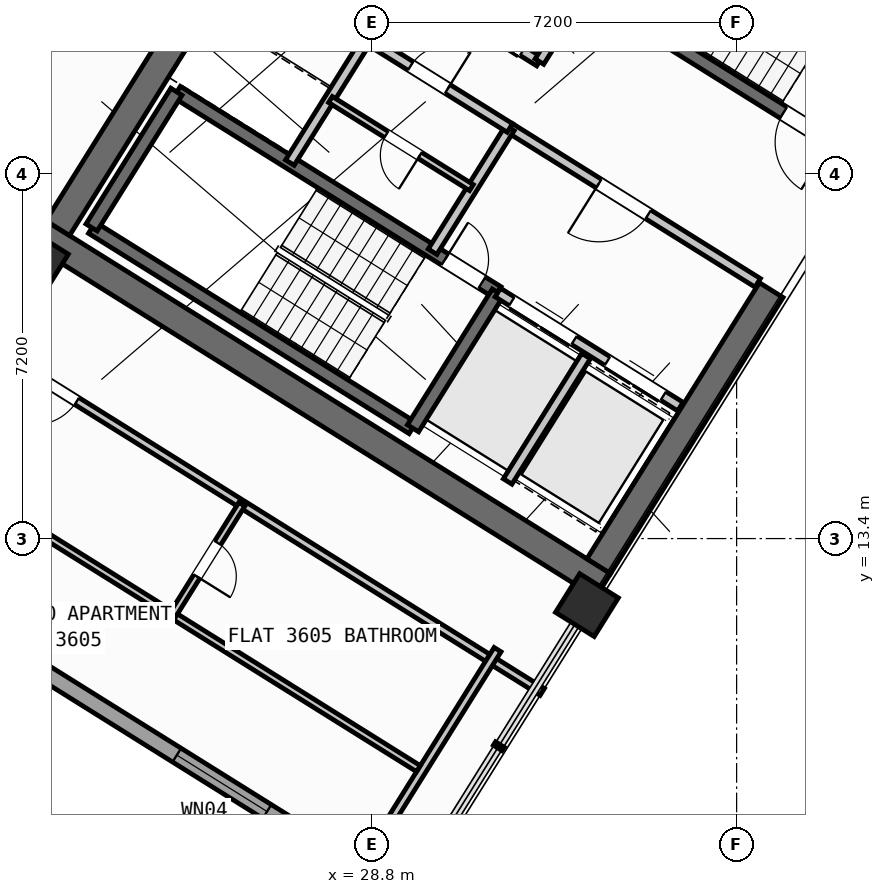
"""IFC4 building model, lengths in metres.
Left out: names, types, materials, properties, quantities, classifications, styles, units other than length and angle.
Written with IfcOpenShell. Run it as: python <this file> out.ifc"""

import sys

from ifc_helpers import new_model, si_unit, direction, frame, frame_2d, origin, origin_2d, place, context, subcontext, project, spatial, rectangle, hollow_rectangle, extrude, source, transform, mapped, element, fill, save


model = new_model("IFC4")
c1 = context("Model", 3, precision=1e-05, world=origin(), true_north=direction((0.0, 1.0)))
c2 = subcontext(c1, "Body", "Model", "MODEL_VIEW")
j1 = project(units=[si_unit("LENGTHUNIT", "METRE"), si_unit("PLANEANGLEUNIT", "RADIAN")], contexts=[c1])
p1 = place(None, origin())
s1 = spatial("IfcSite", under=j1, at=p1, CompositionType="ELEMENT")
p2 = place(p1, origin())
s2 = spatial("IfcBuilding", under=s1, at=p2, CompositionType="ELEMENT")
p3 = place(p2, frame((0.0, 0.0, 144.3)))
s3 = spatial("IfcBuildingStorey", under=s2, at=p3, CompositionType="ELEMENT", Elevation=144.3)
p4 = place(p3, frame((33.366, 12.477, 0.0), z_axis=(0.0, 0.0, 1.0), x_axis=(-0.848047359947, 0.529920442413, 0.0)))
e1 = element("IfcWall", 1, at=p4, inside=s3, PredefinedType="SHEAR", context=c2, shape_type="SweptSolid", body=[
    extrude(rectangle(XDim=13.14, YDim=0.55, at=frame_2d((6.57, 0.0))), origin(), (0.0, 0.0, 1.0), 3.35),
])
p5 = place(p3, frame((36.683, 18.304, 0.0), z_axis=(0.0, 0.0, 1.0), x_axis=(-0.529896466841, -0.848062341122, 0.0)))
e2 = element("IfcWall", 2, at=p5, inside=s3, PredefinedType="SHEAR", context=c2, shape_type="SweptSolid", body=[
    extrude(rectangle(XDim=6.425, YDim=0.55, at=frame_2d((3.212, 0.0))), origin(), (0.0, 0.0, 1.0), 3.35),
])
p6 = place(p3, frame((26.007, 24.976, 0.0), z_axis=(0.0, 0.0, 1.0), x_axis=(-0.529923795287, -0.848045264823, 0.0)))
e3 = element("IfcWall", 3, at=p6, inside=s3, PredefinedType="SHEAR", context=c2, shape_type="SweptSolid", body=[
    extrude(rectangle(XDim=6.425, YDim=0.55, at=frame_2d((3.212, 0.0))), origin(), (0.0, 0.0, 1.0), 3.35),
])
m1 = source(origin(), c2, "Body", "SweptSolid", [
    extrude(hollow_rectangle(XDim=0.9, YDim=0.9, WallThickness=0.036, at=origin_2d()), origin(), (0.0, 0.0, 1.0), 3.6),
])
for number, where, z_axis, x_axis in (
    (4, (33.046, 12.087, 0.0), (0.0, 0.0, 1.0), (-0.848, 0.53, 0.0)),
    (5, (22.191, 18.87, 0.0), (0.0, 0.0, 1.0), (-0.848, 0.53, 0.0)),
):
    element("IfcColumn", number, at=place(p3, frame(where, z_axis=z_axis, x_axis=x_axis)), inside=s3, PredefinedType="COLUMN", context=c2, shape_type="MappedRepresentation", body=[
        mapped(m1, transform((0.0, 0.0, 0.0), scale=1.0)),
    ])
p7 = place(p3, frame((29.268, 6.429, 0.0), z_axis=(0.0, 0.0, 1.0), x_axis=(-0.848049971435, 0.529916263149, 0.0)))
e6 = element("IfcWall", 6, at=p7, inside=s3, PredefinedType="STANDARD", context=c2, shape_type="SweptSolid", body=[
    extrude(rectangle(XDim=31.588, YDim=0.32, at=frame_2d((15.794, 0.0))), origin(), (0.0, 0.0, 1.0), 3.35),
])
p8 = place(p7, frame((16.362, 0.0, 0.0)))
e7 = element("IfcOpeningElement", 7, at=p8, cuts=e6, PredefinedType="OPENING", context=c2, shape_type="SweptSolid", body=[
    extrude(rectangle(XDim=1.2, YDim=2.15, at=frame_2d((0.6, 1.075))), frame((0.0, 0.17, 0.0), z_axis=(0.0, -1.0, 0.0), x_axis=(1.0, 0.0, 0.0)), (0.0, 0.0, 1.0), 0.34),
])
p9 = place(p7, frame((2.989, 0.0, 0.8)))
e8 = element("IfcOpeningElement", 8, at=p9, cuts=e6, PredefinedType="OPENING", context=c2, shape_type="SweptSolid", body=[
    extrude(rectangle(XDim=2.1, YDim=1.55, at=frame_2d((1.05, 0.775))), frame((0.0, 0.17, 0.0), z_axis=(0.0, -1.0, 0.0), x_axis=(1.0, 0.0, 0.0)), (0.0, 0.0, 1.0), 0.34),
])
p10 = place(p7, frame((8.359, 0.0, 0.8)))
e9 = element("IfcOpeningElement", 9, at=p10, cuts=e6, PredefinedType="OPENING", context=c2, shape_type="SweptSolid", body=[
    extrude(rectangle(XDim=2.1, YDim=1.55, at=frame_2d((1.05, 0.775))), frame((0.0, 0.17, 0.0), z_axis=(0.0, -1.0, 0.0), x_axis=(1.0, 0.0, 0.0)), (0.0, 0.0, 1.0), 0.34),
])
p11 = place(p7, frame((13.284, 0.0, 0.95)))
e10 = element("IfcOpeningElement", 10, at=p11, cuts=e6, PredefinedType="OPENING", context=c2, shape_type="SweptSolid", body=[
    extrude(rectangle(XDim=1.2, YDim=1.4, at=frame_2d((0.6, 0.7))), frame((0.0, 0.17, 0.0), z_axis=(0.0, -1.0, 0.0), x_axis=(1.0, 0.0, 0.0)), (0.0, 0.0, 1.0), 0.34),
])
p12 = place(p7, frame((29.188, 0.0, 0.95)))
e11 = element("IfcOpeningElement", 11, at=p12, cuts=e6, PredefinedType="OPENING", context=c2, shape_type="SweptSolid", body=[
    extrude(rectangle(XDim=1.2, YDim=1.4, at=frame_2d((0.6, 0.7))), frame((0.0, 0.17, 0.0), z_axis=(0.0, -1.0, 0.0), x_axis=(1.0, 0.0, 0.0)), (0.0, 0.0, 1.0), 0.34),
])
p13 = place(p7, frame((19.674, 0.0, 1.0)))
e12 = element("IfcOpeningElement", 12, at=p13, cuts=e6, PredefinedType="OPENING", context=c2, shape_type="SweptSolid", body=[
    extrude(rectangle(XDim=0.9, YDim=1.25, at=frame_2d((0.45, 0.625))), frame((0.0, 0.17, 0.0), z_axis=(0.0, -1.0, 0.0), x_axis=(1.0, 0.0, 0.0)), (0.0, 0.0, 1.0), 0.34),
])
p14 = place(p7, frame((21.896, 0.0, 1.0)))
e13 = element("IfcOpeningElement", 13, at=p14, cuts=e6, PredefinedType="OPENING", context=c2, shape_type="SweptSolid", body=[
    extrude(rectangle(XDim=0.9, YDim=1.25, at=frame_2d((0.45, 0.625))), frame((0.0, 0.17, 0.0), z_axis=(0.0, -1.0, 0.0), x_axis=(1.0, 0.0, 0.0)), (0.0, 0.0, 1.0), 0.34),
])
p15 = place(p7, frame((24.106, 0.0, 1.0)))
e14 = element("IfcOpeningElement", 14, at=p15, cuts=e6, PredefinedType="OPENING", context=c2, shape_type="SweptSolid", body=[
    extrude(rectangle(XDim=0.65, YDim=1.15, at=frame_2d((0.325, 0.575))), frame((0.0, 0.17, 0.0), z_axis=(0.0, -1.0, 0.0), x_axis=(1.0, 0.0, 0.0)), (0.0, 0.0, 1.0), 0.34),
])
p16 = place(p7, frame((26.366, 0.0, 1.0)))
e15 = element("IfcOpeningElement", 15, at=p16, cuts=e6, PredefinedType="OPENING", context=c2, shape_type="SweptSolid", body=[
    extrude(rectangle(XDim=0.9, YDim=1.25, at=frame_2d((0.45, 0.625))), frame((0.0, 0.17, 0.0), z_axis=(0.0, -1.0, 0.0), x_axis=(1.0, 0.0, 0.0)), (0.0, 0.0, 1.0), 0.34),
])
p17 = place(p3, frame((29.605, 15.581, 0.0), z_axis=(0.0, 0.0, 1.0), x_axis=(-0.848036911448, 0.529937163087, 0.0)))
e16 = element("IfcWall", 16, at=p17, inside=s3, PredefinedType="SHEAR", context=c2, shape_type="SweptSolid", body=[
    extrude(rectangle(XDim=7.46, YDim=0.26, at=frame_2d((3.73, 0.0))), origin(), (0.0, 0.0, 1.0), 3.35),
])
p18 = place(p3, frame((31.28, 18.261, 0.0), z_axis=(0.0, 0.0, 1.0), x_axis=(-0.848051618787, 0.529913626805, 0.0)))
e17 = element("IfcWall", 17, at=p18, inside=s3, PredefinedType="SHEAR", context=c2, shape_type="SweptSolid", body=[
    extrude(rectangle(XDim=7.46, YDim=0.26, at=frame_2d((3.73, 0.0))), origin(), (0.0, 0.0, 1.0), 3.35),
])
p19 = place(p18, frame((0.36, 0.0, 0.0)))
e18 = element("IfcOpeningElement", 18, at=p19, cuts=e17, PredefinedType="OPENING", context=c2, shape_type="SweptSolid", body=[
    extrude(rectangle(XDim=0.86, YDim=2.05, at=frame_2d((0.43, 1.025))), frame((0.0, 0.14, 0.0), z_axis=(0.0, -1.0, 0.0), x_axis=(1.0, 0.0, 0.0)), (0.0, 0.0, 1.0), 0.28),
])
p20 = place(p3, frame((31.288, 18.256, 0.0), z_axis=(0.0, 0.0, 1.0), x_axis=(-0.529943379326, -0.848033026897, 0.0)))
e19 = element("IfcWall", 19, at=p20, inside=s3, PredefinedType="SHEAR", context=c2, shape_type="SweptSolid", body=[
    extrude(rectangle(XDim=3.16, YDim=0.26, at=frame_2d((1.58, 0.0))), origin(), (0.0, 0.0, 1.0), 3.35),
])
p21 = place(p3, frame((24.945, 22.22, 0.0), z_axis=(0.0, 0.0, 1.0), x_axis=(-0.529908658664, -0.84805472316, 0.0)))
e20 = element("IfcWall", 20, at=p21, inside=s3, PredefinedType="SHEAR", context=c2, shape_type="SweptSolid", body=[
    extrude(rectangle(XDim=3.16, YDim=0.26, at=frame_2d((1.58, 0.0))), origin(), (0.0, 0.0, 1.0), 3.35),
])
p22 = place(p3, frame((38.046, 21.108, 0.0), z_axis=(0.0, 0.0, 1.0), x_axis=(-0.848054434086, 0.529909121291, 0.0)))
e21 = element("IfcWall", 21, at=p22, inside=s3, PredefinedType="SHEAR", context=c2, shape_type="SweptSolid", body=[
    extrude(rectangle(XDim=7.33, YDim=0.26, at=frame_2d((3.665, 0.0))), origin(), (0.0, 0.0, 1.0), 3.35),
])
p23 = place(p22, frame((0.22, 0.0, 0.0)))
e22 = element("IfcOpeningElement", 22, at=p23, cuts=e21, PredefinedType="OPENING", context=c2, shape_type="SweptSolid", body=[
    extrude(rectangle(XDim=1.1, YDim=2.1, at=frame_2d((0.55, 1.05))), frame((0.0, 0.14, 0.0), z_axis=(0.0, -1.0, 0.0), x_axis=(1.0, 0.0, 0.0)), (0.0, 0.0, 1.0), 0.28),
])
p24 = place(p3, frame((34.891, 16.005, 0.0), z_axis=(0.0, 0.0, 1.0), x_axis=(-0.848062873452, 0.529895614884, 0.0)))
e23 = element("IfcWall", 23, at=p24, inside=s3, PredefinedType="STANDARD", context=c2, shape_type="SweptSolid", body=[
    extrude(rectangle(XDim=4.248, YDim=0.2, at=frame_2d((2.124, 0.0))), origin(), (0.0, 0.0, 1.0), 3.34),
])
p25 = place(p24, frame((0.398, 0.0, 0.0)))
e24 = element("IfcOpeningElement", 24, at=p25, cuts=e23, PredefinedType="OPENING", context=c2, shape_type="SweptSolid", body=[
    extrude(rectangle(XDim=1.3, YDim=2.2, at=frame_2d((0.65, 1.1))), frame((0.0, 0.11, 0.0), z_axis=(0.0, -1.0, 0.0), x_axis=(1.0, 0.0, 0.0)), (0.0, 0.0, 1.0), 0.22),
])
p26 = place(p24, frame((2.473, 0.0, 0.0)))
e25 = element("IfcOpeningElement", 25, at=p26, cuts=e23, PredefinedType="OPENING", context=c2, shape_type="SweptSolid", body=[
    extrude(rectangle(XDim=1.45, YDim=2.25, at=frame_2d((0.725, 1.125))), frame((0.0, 0.11, 0.0), z_axis=(0.0, -1.0, 0.0), x_axis=(1.0, 0.0, 0.0)), (0.0, 0.0, 1.0), 0.22),
])
p27 = place(p3, frame((36.417, 18.447, 0.0), z_axis=(0.0, 0.0, 1.0), x_axis=(-0.848064879198, 0.529892404805, 0.0)))
e26 = element("IfcWall", 26, at=p27, inside=s3, PredefinedType="STANDARD", context=c2, shape_type="SweptSolid", body=[
    extrude(rectangle(XDim=5.768, YDim=0.2, at=frame_2d((2.884, 0.0))), origin(), (0.0, 0.0, 1.0), 3.34),
])
p28 = place(p27, frame((2.548, 0.0, 0.0)))
e27 = element("IfcOpeningElement", 27, at=p28, cuts=e26, PredefinedType="OPENING", context=c2, shape_type="SweptSolid", body=[
    extrude(rectangle(XDim=1.15, YDim=2.1, at=frame_2d((0.575, 1.05))), frame((0.0, 0.11, 0.0), z_axis=(0.0, -1.0, 0.0), x_axis=(1.0, 0.0, 0.0)), (0.0, 0.0, 1.0), 0.22),
])
p29 = place(p3, frame((32.108, 22.814, 0.0), z_axis=(0.0, 0.0, 1.0), x_axis=(-0.848042229521, 0.529928652696, 0.0)))
e28 = element("IfcWall", 28, at=p29, inside=s3, PredefinedType="STANDARD", context=c2, shape_type="SweptSolid", body=[
    extrude(rectangle(XDim=5.62, YDim=0.2, at=frame_2d((2.81, 0.0))), origin(), (0.0, 0.0, 1.0), 3.34),
])
p30 = place(p29, frame((0.39, 0.0, 0.0)))
e29 = element("IfcOpeningElement", 29, at=p30, cuts=e28, PredefinedType="OPENING", context=c2, shape_type="SweptSolid", body=[
    extrude(rectangle(XDim=1.1, YDim=2.15, at=frame_2d((0.55, 1.075))), frame((0.0, 0.11, 0.0), z_axis=(0.0, -1.0, 0.0), x_axis=(1.0, 0.0, 0.0)), (0.0, 0.0, 1.0), 0.22),
])
p31 = place(p29, frame((2.25, 0.0, 0.0)))
e30 = element("IfcOpeningElement", 30, at=p31, cuts=e28, PredefinedType="OPENING", context=c2, shape_type="SweptSolid", body=[
    extrude(rectangle(XDim=1.1, YDim=2.15, at=frame_2d((0.55, 1.075))), frame((0.0, 0.11, 0.0), z_axis=(0.0, -1.0, 0.0), x_axis=(1.0, 0.0, 0.0)), (0.0, 0.0, 1.0), 0.22),
])
p32 = place(p29, frame((4.11, 0.0, 0.0)))
e31 = element("IfcOpeningElement", 31, at=p32, cuts=e28, PredefinedType="OPENING", context=c2, shape_type="SweptSolid", body=[
    extrude(rectangle(XDim=1.1, YDim=2.15, at=frame_2d((0.55, 1.075))), frame((0.0, 0.11, 0.0), z_axis=(0.0, -1.0, 0.0), x_axis=(1.0, 0.0, 0.0)), (0.0, 0.0, 1.0), 0.22),
])
p33 = place(p3, frame((32.982, 24.213, 0.0), z_axis=(0.0, 0.0, 1.0), x_axis=(-0.529839334948, -0.84809803628, 0.0)))
e32 = element("IfcWall", 32, at=p33, inside=s3, PredefinedType="STANDARD", context=c2, shape_type="SweptSolid", body=[
    extrude(rectangle(XDim=1.65, YDim=0.2, at=frame_2d((0.825, 0.0))), origin(), (0.0, 0.0, 1.0), 3.34),
])
p34 = place(p3, frame((33.029, 17.003, 0.0), z_axis=(0.0, 0.0, 1.0), x_axis=(-0.529916267533, -0.848049968695, 0.0)))
e33 = element("IfcWall", 33, at=p34, inside=s3, PredefinedType="STANDARD", context=c2, shape_type="SweptSolid", body=[
    extrude(rectangle(XDim=2.92, YDim=0.2, at=frame_2d((1.46, 0.0))), origin(), (0.0, 0.0, 1.0), 3.34),
])
for number, where, z_axis, x_axis in (
    (34, (31.525, 21.504, 0.0), (0.0, 0.0, 1.0), (-0.53, -0.848, 0.0)),
    (35, (28.71, 23.263, 0.0), (0.0, 0.0, 1.0), (-0.53, -0.848, 0.0)),
):
    element("IfcWall", number, at=place(p3, frame(where, z_axis=z_axis, x_axis=x_axis)), inside=s3, PredefinedType="STANDARD", context=c2, shape_type="SweptSolid", body=[
        extrude(rectangle(XDim=2.88, YDim=0.2, at=frame_2d((1.44, 0.0))), origin(), (0.0, 0.0, 1.0), 3.34),
    ])
p35 = place(p3, frame((31.525, 21.504, 0.0), z_axis=(0.0, 0.0, 1.0), x_axis=(-0.848040211232, 0.529931882541, 0.0)))
e36 = element("IfcWall", 36, at=p35, inside=s3, PredefinedType="STANDARD", context=c2, shape_type="SweptSolid", body=[
    extrude(rectangle(XDim=6.218, YDim=0.2, at=frame_2d((3.109, 0.0))), origin(), (0.0, 0.0, 1.0), 3.34),
])
p36 = place(p35, frame((4.4, 0.0, 0.0)))
e37 = element("IfcOpeningElement", 37, at=p36, cuts=e36, PredefinedType="OPENING", context=c2, shape_type="SweptSolid", body=[
    extrude(rectangle(XDim=0.86, YDim=2.05, at=frame_2d((0.43, 1.025))), frame((0.0, 0.11, 0.0), z_axis=(0.0, -1.0, 0.0), x_axis=(1.0, 0.0, 0.0)), (0.0, 0.0, 1.0), 0.22),
])
p37 = place(p35, frame((1.45, 0.0, 0.0)))
e38 = element("IfcOpeningElement", 38, at=p37, cuts=e36, PredefinedType="OPENING", context=c2, shape_type="SweptSolid", body=[
    extrude(rectangle(XDim=0.86, YDim=2.05, at=frame_2d((0.43, 1.025))), frame((0.0, 0.11, 0.0), z_axis=(0.0, -1.0, 0.0), x_axis=(1.0, 0.0, 0.0)), (0.0, 0.0, 1.0), 0.22),
])
p38 = place(p3, frame((30.766, 20.327, 0.0), z_axis=(0.0, 0.0, 1.0), x_axis=(-0.848052663127, 0.529911955482, 0.0)))
e39 = element("IfcWall", 39, at=p38, inside=s3, PredefinedType="PLUMBINGWALL", context=c2, shape_type="SweptSolid", body=[
    extrude(rectangle(XDim=3.28, YDim=0.14, at=frame_2d((1.64, 0.0))), origin(), (0.0, 0.0, 1.0), 3.34),
])
p39 = place(p38, frame((1.2, 0.0, 0.0)))
e40 = element("IfcOpeningElement", 40, at=p39, cuts=e39, PredefinedType="OPENING", context=c2, shape_type="SweptSolid", body=[
    extrude(rectangle(XDim=0.78, YDim=2.05, at=frame_2d((0.39, 1.025))), frame((0.0, 0.08, 0.0), z_axis=(0.0, -1.0, 0.0), x_axis=(1.0, 0.0, 0.0)), (0.0, 0.0, 1.0), 0.16),
])
p40 = place(p3, frame((32.164, 10.374, 0.0), z_axis=(0.0, 0.0, 1.0), x_axis=(-0.848044107957, 0.529925646633, 0.0)))
e41 = element("IfcWall", 41, at=p40, inside=s3, PredefinedType="PARTITIONING", context=c2, shape_type="SweptSolid", body=[
    extrude(rectangle(XDim=15.57, YDim=0.16, at=frame_2d((7.785, 0.0))), origin(), (0.0, 0.0, 1.0), 3.34),
])
p41 = place(p40, frame((10.83, 0.0, 0.0)))
e42 = element("IfcOpeningElement", 42, at=p41, cuts=e41, PredefinedType="OPENING", context=c2, shape_type="SweptSolid", body=[
    extrude(rectangle(XDim=1.0, YDim=2.1, at=frame_2d((0.5, 1.05))), frame((0.0, 0.09, 0.0), z_axis=(0.0, -1.0, 0.0), x_axis=(1.0, 0.0, 0.0)), (0.0, 0.0, 1.0), 0.18),
])
p42 = place(p3, frame((31.282, 11.208, 0.0), z_axis=(0.0, 0.0, 1.0), x_axis=(-0.529938869374, -0.84803584519, 0.0)))
e43 = element("IfcWall", 43, at=p42, inside=s3, PredefinedType="PARTITIONING", context=c2, shape_type="SweptSolid", body=[
    extrude(rectangle(XDim=5.48, YDim=0.16, at=frame_2d((2.74, 0.0))), origin(), (0.0, 0.0, 1.0), 3.34),
])
p43 = place(p3, frame((29.72, 8.859, 0.0), z_axis=(0.0, 0.0, 1.0), x_axis=(-0.848049134363, 0.529917602752, 0.0)))
e44 = element("IfcWall", 44, at=p43, inside=s3, PredefinedType="PLUMBINGWALL", context=c2, shape_type="SweptSolid", body=[
    extrude(rectangle(XDim=14.3, YDim=0.14, at=frame_2d((7.15, 0.0))), origin(), (0.0, 0.0, 1.0), 3.34),
])
p44 = place(p43, frame((9.57, 0.0, 0.0)))
e45 = element("IfcOpeningElement", 45, at=p44, cuts=e44, PredefinedType="OPENING", context=c2, shape_type="SweptSolid", body=[
    extrude(rectangle(XDim=0.92, YDim=2.08, at=frame_2d((0.46, 1.04))), frame((0.0, 0.08, 0.0), z_axis=(0.0, -1.0, 0.0), x_axis=(1.0, 0.0, 0.0)), (0.0, 0.0, 1.0), 0.16),
])
p45 = place(p3, frame((26.237, 14.078, 0.0), z_axis=(0.0, 0.0, 1.0), x_axis=(-0.52995640672, -0.848024885824, 0.0)))
e46 = element("IfcWall", 46, at=p45, inside=s3, PredefinedType="PLUMBINGWALL", context=c2, shape_type="SweptSolid", body=[
    extrude(rectangle(XDim=2.58, YDim=0.14, at=frame_2d((1.29, 0.0))), origin(), (0.0, 0.0, 1.0), 3.34),
])
p46 = place(p45, frame((0.9, 0.0, 0.0)))
e47 = element("IfcOpeningElement", 47, at=p46, cuts=e46, PredefinedType="OPENING", context=c2, shape_type="SweptSolid", body=[
    extrude(rectangle(XDim=0.78, YDim=2.05, at=frame_2d((0.39, 1.025))), frame((0.0, 0.08, 0.0), z_axis=(0.0, -1.0, 0.0), x_axis=(1.0, 0.0, 0.0)), (0.0, 0.0, 1.0), 0.16),
])
m2 = source(origin(), c2, "Body", "SweptSolid", [
    extrude(rectangle(XDim=2.1, YDim=1.55, at=frame_2d((1.05, 0.775))), frame((0.0, 0.03, 0.0), z_axis=(0.0, -1.0, 0.0), x_axis=(1.0, 0.0, 0.0)), (0.0, 0.0, 1.0), 0.06),
])
p47 = place(p9, origin())
e48 = element("IfcWindow", 48, at=p47, inside=s3, PartitioningType="SINGLE_PANEL", PredefinedType="WINDOW", context=c2, shape_type="MappedRepresentation", body=[
    mapped(m2, transform((0.0, 0.0, 0.0), scale=1.0)),
])
fill(e8, e48)
m3 = source(origin(), c2, "Body", "SweptSolid", [
    extrude(rectangle(XDim=0.86, YDim=2.05, at=frame_2d((0.43, 1.025))), frame((0.0, 0.025, 0.0), z_axis=(0.0, -1.0, 0.0), x_axis=(1.0, 0.0, 0.0)), (0.0, 0.0, 1.0), 0.05),
])
p48 = place(p19, frame((0.86, 0.0, 0.0), z_axis=(0.0, 0.0, 1.0), x_axis=(-1.0, 0.0, 0.0)))
e49 = element("IfcDoor", 49, at=p48, inside=s3, OperationType="SINGLE_SWING_LEFT", PredefinedType="DOOR", context=c2, shape_type="MappedRepresentation", body=[
    mapped(m3, transform((0.0, 0.0, 0.0), scale=1.0)),
])
fill(e18, e49)
m4 = source(origin(), c2, "Body", "SweptSolid", [
    extrude(rectangle(XDim=1.1, YDim=2.1, at=frame_2d((0.55, 1.05))), frame((0.0, 0.025, 0.0), z_axis=(0.0, -1.0, 0.0), x_axis=(1.0, 0.0, 0.0)), (0.0, 0.0, 1.0), 0.05),
])
p49 = place(p23, origin())
e50 = element("IfcDoor", 50, at=p49, inside=s3, OperationType="SINGLE_SWING_LEFT", PredefinedType="DOOR", context=c2, shape_type="MappedRepresentation", body=[
    mapped(m4, transform((0.0, 0.0, 0.0), scale=1.0)),
])
fill(e22, e50)
m5 = source(origin(), c2, "Body", "SweptSolid", [
    extrude(rectangle(XDim=1.15, YDim=2.1, at=frame_2d((0.575, 1.05))), frame((0.0, 0.025, 0.0), z_axis=(0.0, -1.0, 0.0), x_axis=(1.0, 0.0, 0.0)), (0.0, 0.0, 1.0), 0.05),
])
p50 = place(p28, origin())
e51 = element("IfcDoor", 51, at=p50, inside=s3, OperationType="SINGLE_SWING_RIGHT", PredefinedType="DOOR", context=c2, shape_type="MappedRepresentation", body=[
    mapped(m5, transform((0.0, 0.0, 0.0), scale=1.0)),
])
fill(e27, e51)
m6 = source(origin(), c2, "Body", "SweptSolid", [
    extrude(rectangle(XDim=1.3, YDim=2.2, at=frame_2d((0.65, 1.1))), frame((0.0, 0.025, 0.0), z_axis=(0.0, -1.0, 0.0), x_axis=(1.0, 0.0, 0.0)), (0.0, 0.0, 1.0), 0.05),
])
p51 = place(p25, origin())
e52 = element("IfcDoor", 52, at=p51, inside=s3, OperationType="DOUBLE_DOOR_SLIDING", PredefinedType="DOOR", context=c2, shape_type="MappedRepresentation", body=[
    mapped(m6, transform((0.0, 0.0, 0.0), scale=1.0)),
])
fill(e24, e52)
m7 = source(origin(), c2, "Body", "SweptSolid", [
    extrude(rectangle(XDim=1.45, YDim=2.25, at=frame_2d((0.725, 1.125))), frame((0.0, 0.025, 0.0), z_axis=(0.0, -1.0, 0.0), x_axis=(1.0, 0.0, 0.0)), (0.0, 0.0, 1.0), 0.05),
])
p52 = place(p26, origin())
e53 = element("IfcDoor", 53, at=p52, inside=s3, OperationType="DOUBLE_DOOR_SLIDING", PredefinedType="DOOR", context=c2, shape_type="MappedRepresentation", body=[
    mapped(m7, transform((0.0, 0.0, 0.0), scale=1.0)),
])
fill(e25, e53)
p53 = place(p37, frame((0.86, 0.0, 0.0), z_axis=(0.0, 0.0, 1.0), x_axis=(-1.0, 0.0, 0.0)))
e54 = element("IfcDoor", 54, at=p53, inside=s3, OperationType="SINGLE_SWING_RIGHT", PredefinedType="DOOR", context=c2, shape_type="MappedRepresentation", body=[
    mapped(m3, transform((0.0, 0.0, 0.0), scale=1.0)),
])
fill(e38, e54)
m8 = source(origin(), c2, "Body", "SweptSolid", [
    extrude(rectangle(XDim=0.78, YDim=2.05, at=frame_2d((0.39, 1.025))), frame((0.0, 0.025, 0.0), z_axis=(0.0, -1.0, 0.0), x_axis=(1.0, 0.0, 0.0)), (0.0, 0.0, 1.0), 0.05),
])
p54 = place(p39, origin())
e55 = element("IfcDoor", 55, at=p54, inside=s3, OperationType="SINGLE_SWING_LEFT", PredefinedType="DOOR", context=c2, shape_type="MappedRepresentation", body=[
    mapped(m8, transform((0.0, 0.0, 0.0), scale=1.0)),
])
fill(e40, e55)
m9 = source(origin(), c2, "Body", "SweptSolid", [
    extrude(rectangle(XDim=1.0, YDim=2.1, at=frame_2d((0.5, 1.05))), frame((0.0, 0.025, 0.0), z_axis=(0.0, -1.0, 0.0), x_axis=(1.0, 0.0, 0.0)), (0.0, 0.0, 1.0), 0.05),
])
p55 = place(p41, origin())
e56 = element("IfcDoor", 56, at=p55, inside=s3, OperationType="SINGLE_SWING_RIGHT", PredefinedType="DOOR", context=c2, shape_type="MappedRepresentation", body=[
    mapped(m9, transform((0.0, 0.0, 0.0), scale=1.0)),
])
fill(e42, e56)
p56 = place(p46, origin())
e57 = element("IfcDoor", 57, at=p56, inside=s3, OperationType="SINGLE_SWING_RIGHT", PredefinedType="DOOR", context=c2, shape_type="MappedRepresentation", body=[
    mapped(m8, transform((0.0, 0.0, 0.0), scale=1.0)),
])
fill(e47, e57)
save(model, sys.argv[1])
